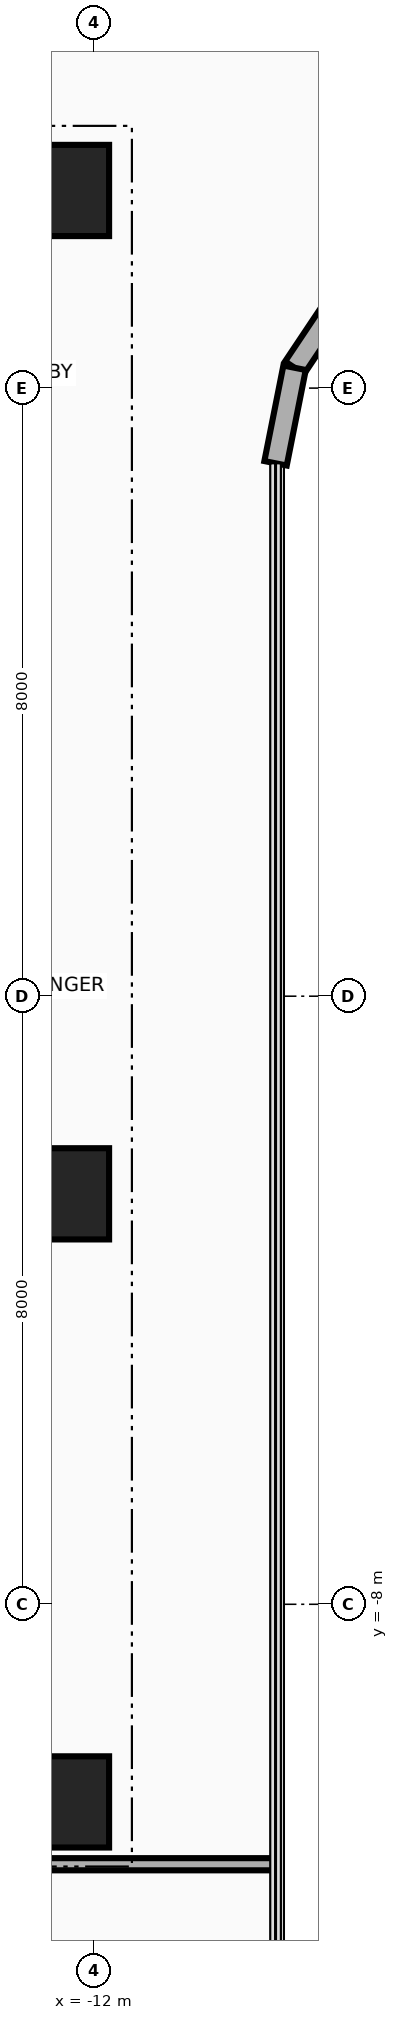
"""IFC4 building model, lengths in metres.
Left out: names, types, materials, properties, quantities, classifications, styles, units other than length and angle.
Written with IfcOpenShell. Run it as: python <this file> out.ifc"""

import sys

from ifc_helpers import new_model, si_unit, direction, frame, frame_2d, origin, origin_2d, place, context, subcontext, project, spatial, rectangle, extrude, source, transform, mapped, element, save


model = new_model("IFC4")
c1 = context("Model", 3, precision=1e-05, world=origin(), true_north=direction((0.0, 1.0)))
c2 = subcontext(c1, "Body", "Model", "MODEL_VIEW")
j1 = project(units=[si_unit("LENGTHUNIT", "METRE"), si_unit("PLANEANGLEUNIT", "RADIAN")], contexts=[c1])
p1 = place(None, origin())
s1 = spatial("IfcSite", under=j1, at=p1, CompositionType="ELEMENT")
p2 = place(p1, origin())
s2 = spatial("IfcBuilding", under=s1, at=p2, CompositionType="ELEMENT")
p3 = place(p2, frame((0.0, 0.0, 124.2)))
s3 = spatial("IfcBuildingStorey", under=s2, at=p3, CompositionType="ELEMENT", Elevation=124.2)
for number, where, z_axis, x_axis in (
    (1, (-22.65, 10.8, 0.0), (0.0, 0.0, 1.0), (1.0, 0.0, 0.0)),
    (2, (-22.65, -10.8, 0.0), (0.0, 0.0, 1.0), (1.0, 0.0, 0.0)),
):
    element("IfcWall", number, at=place(p3, frame(where, z_axis=z_axis, x_axis=x_axis)), inside=s3, PredefinedType="SHEAR", context=c2, shape_type="SweptSolid", body=[
        extrude(rectangle(XDim=10.25, YDim=0.7, at=frame_2d((5.125, 0.0))), origin(), (0.0, 0.0, 1.0), 3.46),
    ])
m1 = source(origin(), c2, "Body", "SweptSolid", [
    extrude(rectangle(XDim=1.2, YDim=1.2, at=origin_2d()), origin(), (0.0, 0.0, 1.0), 3.7),
])
for number, where, z_axis, x_axis in (
    (3, (-12.4, -10.6, 0.0), (0.0, 0.0, 1.0), (1.0, 0.0, 0.0)),
    (4, (-12.4, -2.6, 0.0), (0.0, 0.0, 1.0), (1.0, 0.0, 0.0)),
    (5, (-12.4, 10.6, 0.0), (0.0, 0.0, 1.0), (1.0, 0.0, 0.0)),
):
    element("IfcColumn", number, at=place(p3, frame(where, z_axis=z_axis, x_axis=x_axis)), inside=s3, PredefinedType="COLUMN", context=c2, shape_type="MappedRepresentation", body=[
        mapped(m1, transform((0.0, 0.0, 0.0), x_axis=(1.0, 0.0, 0.0), y_axis=(0.0, 1.0, 0.0), z_axis=(0.0, 0.0, 1.0), scale=1.0)),
    ])
p4 = place(p3, frame((-8.642, 9.342, 0.0), z_axis=(0.0, 0.0, 1.0), x_axis=(-0.555615398575, -0.831439431869, 0.0)))
e6 = element("IfcWall", 6, at=p4, inside=s3, PredefinedType="SOLIDWALL", context=c2, shape_type="SweptSolid", body=[
    extrude(rectangle(XDim=1.292, YDim=0.3, at=frame_2d((0.646, 0.0))), origin(), (0.0, 0.0, 1.0), 3.46),
])
p5 = place(p3, frame((-9.36, 8.268, 0.0), z_axis=(0.0, 0.0, 1.0), x_axis=(-0.195090163074, -0.980785312019, 0.0)))
e7 = element("IfcWall", 7, at=p5, inside=s3, PredefinedType="SOLIDWALL", context=c2, shape_type="SweptSolid", body=[
    extrude(rectangle(XDim=1.281, YDim=0.3, at=frame_2d((0.641, 0.0))), origin(), (0.0, 0.0, 1.0), 3.46),
])
p6 = place(p3, frame((-23.45, -11.42, 0.0), z_axis=(0.0, 0.0, 1.0), x_axis=(1.0, 0.0, 0.0)))
e8 = element("IfcWall", 8, at=p6, inside=s3, PredefinedType="PARTITIONING", context=c2, shape_type="SweptSolid", body=[
    extrude(rectangle(XDim=13.84, YDim=0.16, at=frame_2d((6.92, 0.0))), origin(), (0.0, 0.0, 1.0), 2.834),
])
save(model, sys.argv[1])
